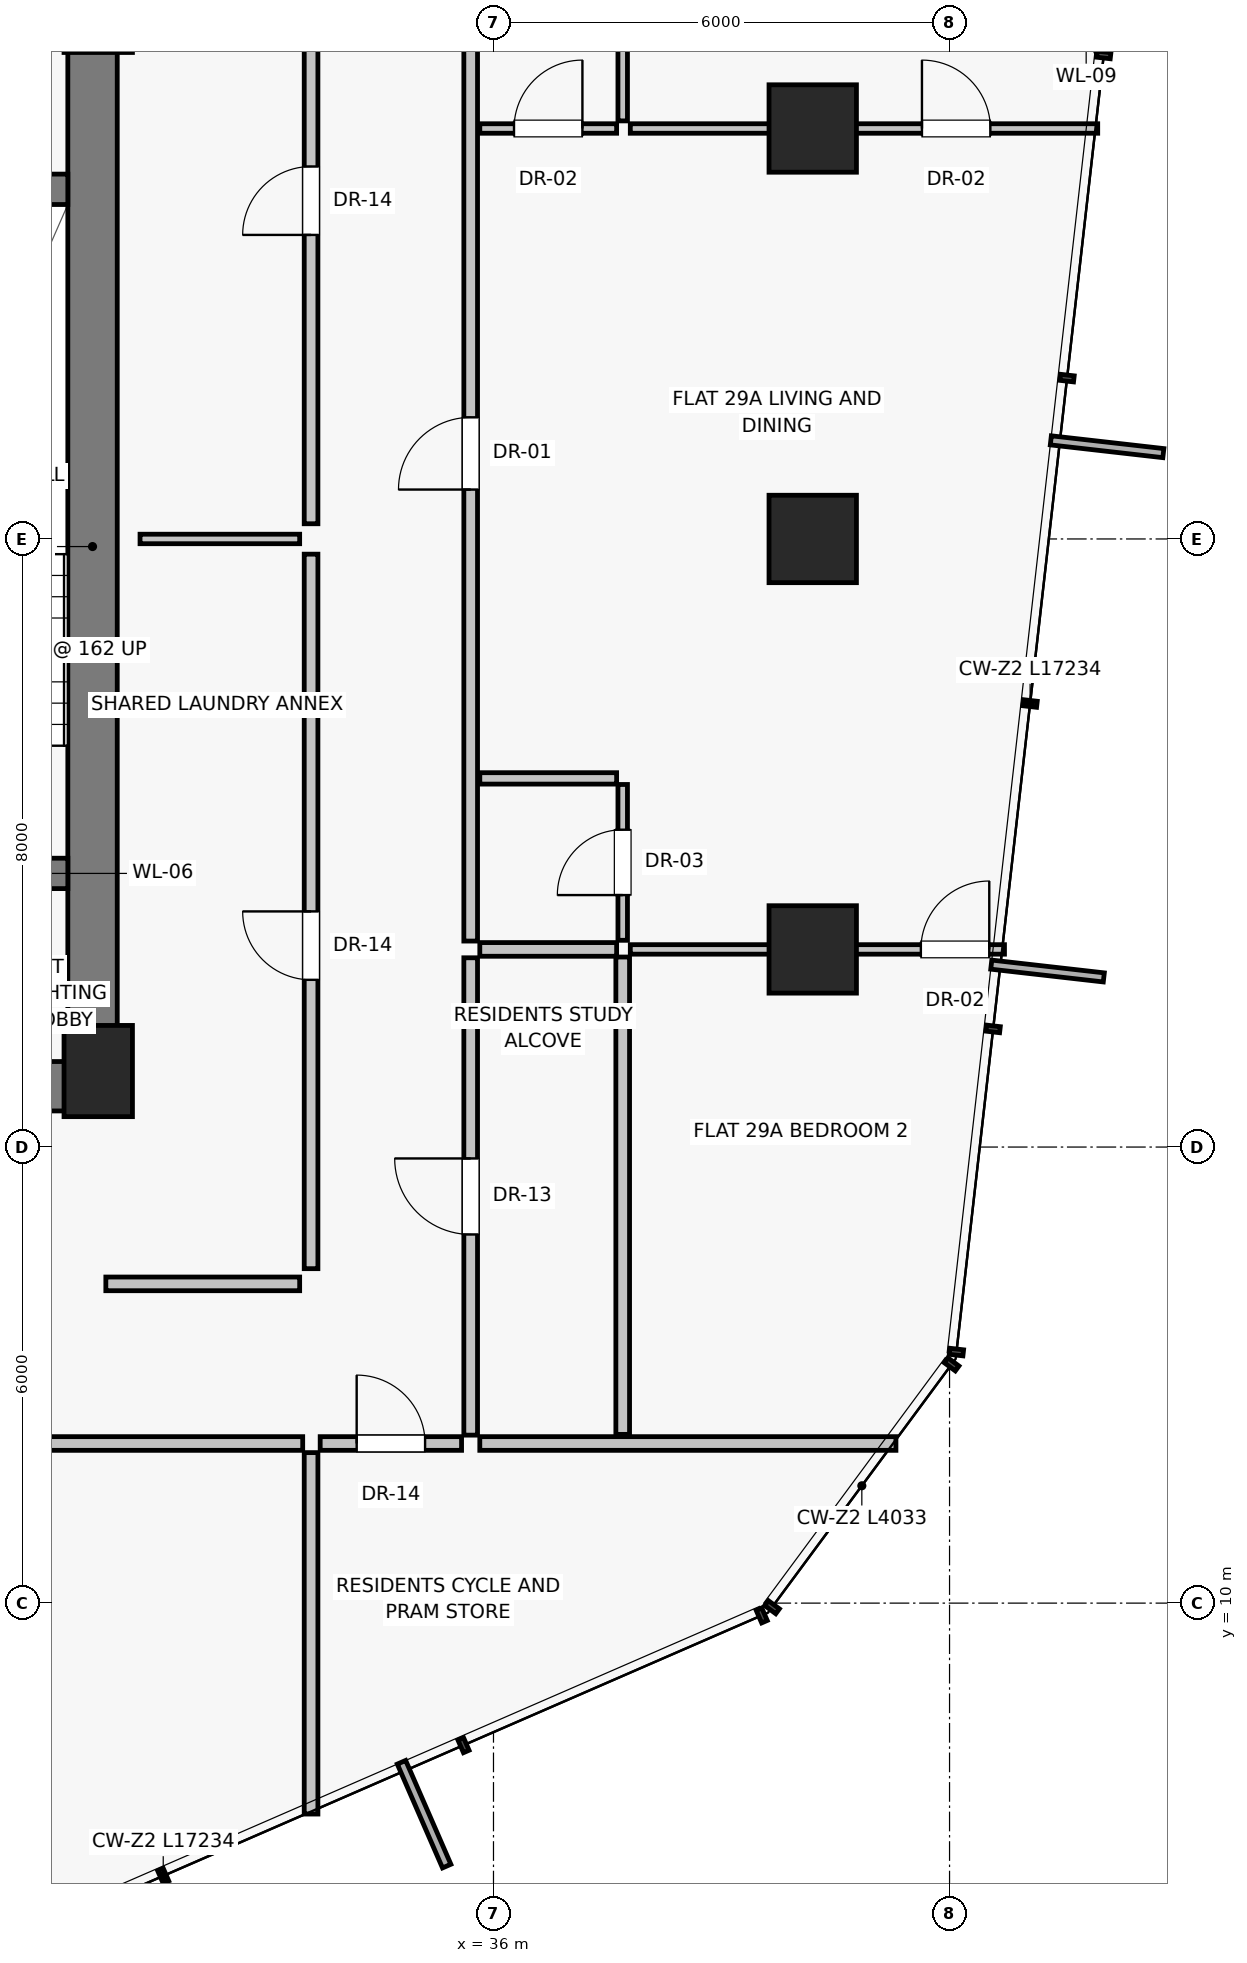
"""IFC4 building model, lengths in metres.
Left out: names, types, materials, properties, quantities, classifications, styles, units other than length and angle.
Written with IfcOpenShell. Run it as: python <this file> out.ifc"""

import sys

from ifc_helpers import new_model, si_unit, direction, frame, frame_2d, origin, origin_2d, place, context, subcontext, project, spatial, rectangle, extrude, source, transform, mapped, element, fill, save


model = new_model("IFC4")
c1 = context("Model", 3, precision=1e-05, world=origin(), true_north=direction((0.0, 1.0)))
c2 = subcontext(c1, "Body", "Model", "MODEL_VIEW")
j1 = project(units=[si_unit("LENGTHUNIT", "METRE"), si_unit("PLANEANGLEUNIT", "RADIAN")], contexts=[c1])
p1 = place(None, origin())
s1 = spatial("IfcSite", under=j1, at=p1, CompositionType="ELEMENT")
p2 = place(p1, origin())
s2 = spatial("IfcBuilding", under=s1, at=p2, CompositionType="ELEMENT")
p3 = place(p2, frame((0.0, 0.0, 105.7)))
s3 = spatial("IfcBuildingStorey", under=s2, at=p3, CompositionType="ELEMENT", Elevation=105.7)
p4 = place(p3, frame((30.8, 17.0, 0.0), z_axis=(0.0, 0.0, 1.0), x_axis=(1.0, 0.0, 0.0)))
e1 = element("IfcColumn", 1, at=p4, inside=s3, PredefinedType="PILASTER", context=c2, shape_type="SweptSolid", body=[
    extrude(rectangle(XDim=0.9, YDim=1.2, at=origin_2d()), origin(), (0.0, 0.0, 1.0), 3.25),
])
for number, where, z_axis, x_axis in (
    (2, (40.2, 18.6, 0.0), (0.0, 0.0, 1.0), (1.0, 0.0, 0.0)),
    (3, (40.2, 24.0, 0.0), (0.0, 0.0, 1.0), (1.0, 0.0, 0.0)),
    (4, (40.2, 29.4, 0.0), (0.0, 0.0, 1.0), (1.0, 0.0, 0.0)),
):
    element("IfcColumn", number, at=place(p3, frame(where, z_axis=z_axis, x_axis=x_axis)), inside=s3, PredefinedType="COLUMN", context=c2, shape_type="SweptSolid", body=[
        extrude(rectangle(XDim=1.15, YDim=1.15, at=origin_2d()), origin(), (0.0, 0.0, 1.0), 3.25),
    ])
p5 = place(p3, frame((44.055, 30.42, 0.0), z_axis=(0.0, 0.0, 1.0), x_axis=(-0.399084577484, 0.916914118124, 0.0)))
e5 = element("IfcWall", 5, at=p5, inside=s3, PredefinedType="SOLIDWALL", context=c2, shape_type="SweptSolid", body=[
    extrude(rectangle(XDim=4.233, YDim=0.25, at=frame_2d((2.117, 0.0))), origin(), (0.0, 0.0, 1.0), 2.97),
])
p6 = place(p5, frame((1.542, 0.0, 0.0)))
e6 = element("IfcOpeningElement", 6, at=p6, cuts=e5, PredefinedType="OPENING", context=c2, shape_type="SweptSolid", body=[
    extrude(rectangle(XDim=1.15, YDim=2.25, at=frame_2d((0.575, 1.125))), frame((0.0, 0.135, 0.0), z_axis=(0.0, -1.0, 0.0), x_axis=(1.0, 0.0, 0.0)), (0.0, 0.0, 1.0), 0.27),
])
p7 = place(p3, frame((30.725, 16.8, 0.0), z_axis=(0.0, 0.0, 1.0), x_axis=(0.0, 1.0, 0.0)))
e7 = element("IfcWall", 7, at=p7, inside=s3, PredefinedType="SHEAR", context=c2, shape_type="SweptSolid", body=[
    extrude(rectangle(XDim=14.2, YDim=0.65, at=frame_2d((7.1, 0.0))), origin(), (0.0, 0.0, 1.0), 2.97),
])
p8 = place(p3, frame((24.95, 16.8, 0.0), z_axis=(0.0, 0.0, 1.0), x_axis=(1.0, 0.0, 0.0)))
e8 = element("IfcWall", 8, at=p8, inside=s3, PredefinedType="SHEAR", context=c2, shape_type="SweptSolid", body=[
    extrude(rectangle(XDim=5.85, YDim=0.65, at=frame_2d((2.925, 0.0))), origin(), (0.0, 0.0, 1.0), 2.97),
])
p9 = place(p8, frame((2.15, 0.0, 0.0)))
e9 = element("IfcOpeningElement", 9, at=p9, cuts=e8, PredefinedType="OPENING", context=c2, shape_type="SweptSolid", body=[
    extrude(rectangle(XDim=1.2, YDim=2.03, at=frame_2d((0.6, 1.015))), frame((0.0, 0.335, 0.0), z_axis=(0.0, -1.0, 0.0), x_axis=(1.0, 0.0, 0.0)), (0.0, 0.0, 1.0), 0.67),
])
p10 = place(p3, frame((27.0, 19.6, 0.0), z_axis=(0.0, 0.0, 1.0), x_axis=(1.0, 0.0, 0.0)))
e10 = element("IfcWall", 10, at=p10, inside=s3, PredefinedType="SHEAR", context=c2, shape_type="SweptSolid", body=[
    extrude(rectangle(XDim=3.4, YDim=0.4, at=frame_2d((1.7, 0.0))), origin(), (0.0, 0.0, 1.0), 2.97),
])
p11 = place(p10, frame((1.05, 0.0, 0.0)))
e11 = element("IfcOpeningElement", 11, at=p11, cuts=e10, PredefinedType="OPENING", context=c2, shape_type="SweptSolid", body=[
    extrude(rectangle(XDim=1.1, YDim=2.03, at=frame_2d((0.55, 1.015))), frame((0.0, 0.21, 0.0), z_axis=(0.0, -1.0, 0.0), x_axis=(1.0, 0.0, 0.0)), (0.0, 0.0, 1.0), 0.42),
])
p12 = place(p3, frame((27.0, 28.6, 0.0), z_axis=(0.0, 0.0, 1.0), x_axis=(1.0, 0.0, 0.0)))
e12 = element("IfcWall", 12, at=p12, inside=s3, PredefinedType="SHEAR", context=c2, shape_type="SweptSolid", body=[
    extrude(rectangle(XDim=3.4, YDim=0.4, at=frame_2d((1.7, 0.0))), origin(), (0.0, 0.0, 1.0), 2.97),
])
p13 = place(p3, frame((33.6, 14.4, 0.0), z_axis=(0.0, 0.0, 1.0), x_axis=(0.0, 1.0, 0.0)))
e13 = element("IfcWall", 13, at=p13, inside=s3, PredefinedType="PARTITIONING", context=c2, shape_type="SweptSolid", body=[
    extrude(rectangle(XDim=9.4, YDim=0.18, at=frame_2d((4.7, 0.0))), origin(), (0.0, 0.0, 1.0), 2.97),
])
p14 = place(p13, frame((3.8, 0.0, 0.0)))
e14 = element("IfcOpeningElement", 14, at=p14, cuts=e13, PredefinedType="OPENING", context=c2, shape_type="SweptSolid", body=[
    extrude(rectangle(XDim=0.9, YDim=2.01, at=frame_2d((0.45, 1.005))), frame((0.0, 0.1, 0.0), z_axis=(0.0, -1.0, 0.0), x_axis=(1.0, 0.0, 0.0)), (0.0, 0.0, 1.0), 0.2),
])
p15 = place(p3, frame((33.6, 24.2, 0.0), z_axis=(0.0, 0.0, 1.0), x_axis=(0.0, 1.0, 0.0)))
e15 = element("IfcWall", 15, at=p15, inside=s3, PredefinedType="PARTITIONING", context=c2, shape_type="SweptSolid", body=[
    extrude(rectangle(XDim=9.2, YDim=0.18, at=frame_2d((4.6, 0.0))), origin(), (0.0, 0.0, 1.0), 2.97),
])
p16 = place(p15, frame((3.8, 0.0, 0.0)))
e16 = element("IfcOpeningElement", 16, at=p16, cuts=e15, PredefinedType="OPENING", context=c2, shape_type="SweptSolid", body=[
    extrude(rectangle(XDim=0.9, YDim=2.01, at=frame_2d((0.45, 1.005))), frame((0.0, 0.1, 0.0), z_axis=(0.0, -1.0, 0.0), x_axis=(1.0, 0.0, 0.0)), (0.0, 0.0, 1.0), 0.2),
])
p17 = place(p3, frame((31.35, 24.0, 0.0), z_axis=(0.0, 0.0, 1.0), x_axis=(1.0, 0.0, 0.0)))
e17 = element("IfcWall", 17, at=p17, inside=s3, PredefinedType="PARTITIONING", context=c2, shape_type="SweptSolid", body=[
    extrude(rectangle(XDim=2.1, YDim=0.125, at=frame_2d((1.05, 0.0))), origin(), (0.0, 0.0, 1.0), 2.97),
])
p18 = place(p3, frame((30.9, 14.2, 0.0), z_axis=(0.0, 0.0, 1.0), x_axis=(1.0, 0.0, 0.0)))
e18 = element("IfcWall", 18, at=p18, inside=s3, PredefinedType="PARTITIONING", context=c2, shape_type="SweptSolid", body=[
    extrude(rectangle(XDim=2.55, YDim=0.18, at=frame_2d((1.275, 0.0))), origin(), (0.0, 0.0, 1.0), 2.97),
])
p19 = place(p3, frame((33.6, 11.98, 0.0), z_axis=(0.0, 0.0, 1.0), x_axis=(0.0, -1.0, 0.0)))
e19 = element("IfcWall", 19, at=p19, inside=s3, PredefinedType="PARTITIONING", context=c2, shape_type="SweptSolid", body=[
    extrude(rectangle(XDim=4.755, YDim=0.18, at=frame_2d((2.377, 0.0))), origin(), (0.0, 0.0, 1.0), 2.97),
])
p20 = place(p3, frame((24.554, 12.1, 0.0), z_axis=(0.0, 0.0, 1.0), x_axis=(1.0, 0.0, 0.0)))
e20 = element("IfcWall", 20, at=p20, inside=s3, PredefinedType="PARTITIONING", context=c2, shape_type="SweptSolid", body=[
    extrude(rectangle(XDim=8.936, YDim=0.18, at=frame_2d((4.468, 0.0))), origin(), (0.0, 0.0, 1.0), 2.55),
])
p21 = place(p20, frame((3.968, 0.0, 0.0)))
e21 = element("IfcOpeningElement", 21, at=p21, cuts=e20, PredefinedType="OPENING", context=c2, shape_type="SweptSolid", body=[
    extrude(rectangle(XDim=1.0, YDim=2.01, at=frame_2d((0.5, 1.005))), frame((0.0, 0.1, 0.0), z_axis=(0.0, -1.0, 0.0), x_axis=(1.0, 0.0, 0.0)), (0.0, 0.0, 1.0), 0.2),
])
p22 = place(p3, frame((35.82, 12.1, 0.0), z_axis=(0.0, 0.0, 1.0), x_axis=(1.0, 0.0, 0.0)))
e22 = element("IfcWall", 22, at=p22, inside=s3, PredefinedType="PARTITIONING", context=c2, shape_type="SweptSolid", body=[
    extrude(rectangle(XDim=5.475, YDim=0.18, at=frame_2d((2.737, 0.0))), origin(), (0.0, 0.0, 1.0), 2.97),
])
p23 = place(p3, frame((35.7, 12.21, 0.0), z_axis=(0.0, 0.0, 1.0), x_axis=(0.0, 1.0, 0.0)))
e23 = element("IfcWall", 23, at=p23, inside=s3, PredefinedType="PARTITIONING", context=c2, shape_type="SweptSolid", body=[
    extrude(rectangle(XDim=6.28, YDim=0.18, at=frame_2d((3.14, 0.0))), origin(), (0.0, 0.0, 1.0), 2.55),
])
p24 = place(p23, frame((2.64, 0.0, 0.0)))
e24 = element("IfcOpeningElement", 24, at=p24, cuts=e23, PredefinedType="OPENING", context=c2, shape_type="SweptSolid", body=[
    extrude(rectangle(XDim=1.0, YDim=2.01, at=frame_2d((0.5, 1.005))), frame((0.0, 0.1, 0.0), z_axis=(0.0, -1.0, 0.0), x_axis=(1.0, 0.0, 0.0)), (0.0, 0.0, 1.0), 0.2),
])
p25 = place(p3, frame((35.7, 18.71, 0.0), z_axis=(0.0, 0.0, 1.0), x_axis=(0.0, 1.0, 0.0)))
e25 = element("IfcWall", 25, at=p25, inside=s3, PredefinedType="PARTITIONING", context=c2, shape_type="SweptSolid", body=[
    extrude(rectangle(XDim=16.88, YDim=0.18, at=frame_2d((8.44, 0.0))), origin(), (0.0, 0.0, 1.0), 2.55),
])
p26 = place(p25, frame((5.94, 0.0, 0.0)))
e26 = element("IfcOpeningElement", 26, at=p26, cuts=e25, PredefinedType="OPENING", context=c2, shape_type="SweptSolid", body=[
    extrude(rectangle(XDim=0.95, YDim=2.02, at=frame_2d((0.475, 1.01))), frame((0.0, 0.1, 0.0), z_axis=(0.0, -1.0, 0.0), x_axis=(1.0, 0.0, 0.0)), (0.0, 0.0, 1.0), 0.2),
])
p27 = place(p3, frame((37.7, 12.22, 0.0), z_axis=(0.0, 0.0, 1.0), x_axis=(0.0, 1.0, 0.0)))
e27 = element("IfcWall", 27, at=p27, inside=s3, PredefinedType="PARTITIONING", context=c2, shape_type="SweptSolid", body=[
    extrude(rectangle(XDim=6.28, YDim=0.18, at=frame_2d((3.14, 0.0))), origin(), (0.0, 0.0, 1.0), 2.97),
])
p28 = place(p3, frame((35.82, 18.6, 0.0), z_axis=(0.0, 0.0, 1.0), x_axis=(1.0, 0.0, 0.0)))
e28 = element("IfcWall", 28, at=p28, inside=s3, PredefinedType="PARTITIONING", context=c2, shape_type="SweptSolid", body=[
    extrude(rectangle(XDim=1.8, YDim=0.18, at=frame_2d((0.9, 0.0))), origin(), (0.0, 0.0, 1.0), 2.348),
])
p29 = place(p3, frame((37.8, 18.6, 0.0), z_axis=(0.0, 0.0, 1.0), x_axis=(1.0, 0.0, 0.0)))
e29 = element("IfcWall", 29, at=p29, inside=s3, PredefinedType="PARTITIONING", context=c2, shape_type="SweptSolid", body=[
    extrude(rectangle(XDim=4.923, YDim=0.125, at=frame_2d((2.461, 0.0))), origin(), (0.0, 0.0, 1.0), 2.348),
])
p30 = place(p29, frame((3.823, 0.0, 0.0)))
e30 = element("IfcOpeningElement", 30, at=p30, cuts=e29, PredefinedType="OPENING", context=c2, shape_type="SweptSolid", body=[
    extrude(rectangle(XDim=0.9, YDim=2.01, at=frame_2d((0.45, 1.005))), frame((0.0, 0.073, 0.0), z_axis=(0.0, -1.0, 0.0), x_axis=(1.0, 0.0, 0.0)), (0.0, 0.0, 1.0), 0.145),
])
p31 = place(p3, frame((35.82, 20.85, 0.0), z_axis=(0.0, 0.0, 1.0), x_axis=(1.0, 0.0, 0.0)))
e31 = element("IfcWall", 31, at=p31, inside=s3, PredefinedType="PARTITIONING", context=c2, shape_type="SweptSolid", body=[
    extrude(rectangle(XDim=1.8, YDim=0.15, at=frame_2d((0.9, 0.0))), origin(), (0.0, 0.0, 1.0), 2.97),
])
p32 = place(p3, frame((37.7, 18.72, 0.0), z_axis=(0.0, 0.0, 1.0), x_axis=(0.0, 1.0, 0.0)))
e32 = element("IfcWall", 32, at=p32, inside=s3, PredefinedType="PARTITIONING", context=c2, shape_type="SweptSolid", body=[
    extrude(rectangle(XDim=2.05, YDim=0.125, at=frame_2d((1.025, 0.0))), origin(), (0.0, 0.0, 1.0), 2.97),
])
p33 = place(p32, frame((0.595, 0.0, 0.0)))
e33 = element("IfcOpeningElement", 33, at=p33, cuts=e32, PredefinedType="OPENING", context=c2, shape_type="SweptSolid", body=[
    extrude(rectangle(XDim=0.86, YDim=2.01, at=frame_2d((0.43, 1.005))), frame((0.0, 0.073, 0.0), z_axis=(0.0, -1.0, 0.0), x_axis=(1.0, 0.0, 0.0)), (0.0, 0.0, 1.0), 0.145),
])
p34 = place(p3, frame((35.82, 29.4, 0.0), z_axis=(0.0, 0.0, 1.0), x_axis=(1.0, 0.0, 0.0)))
e34 = element("IfcWall", 34, at=p34, inside=s3, PredefinedType="PARTITIONING", context=c2, shape_type="SweptSolid", body=[
    extrude(rectangle(XDim=1.8, YDim=0.125, at=frame_2d((0.9, 0.0))), origin(), (0.0, 0.0, 1.0), 2.348),
])
p35 = place(p34, frame((0.45, 0.0, 0.0)))
e35 = element("IfcOpeningElement", 35, at=p35, cuts=e34, PredefinedType="OPENING", context=c2, shape_type="SweptSolid", body=[
    extrude(rectangle(XDim=0.9, YDim=2.01, at=frame_2d((0.45, 1.005))), frame((0.0, 0.073, 0.0), z_axis=(0.0, -1.0, 0.0), x_axis=(1.0, 0.0, 0.0)), (0.0, 0.0, 1.0), 0.145),
])
p36 = place(p3, frame((37.7, 29.5, 0.0), z_axis=(0.0, 0.0, 1.0), x_axis=(0.0, 1.0, 0.0)))
e36 = element("IfcWall", 36, at=p36, inside=s3, PredefinedType="PARTITIONING", context=c2, shape_type="SweptSolid", body=[
    extrude(rectangle(XDim=6.08, YDim=0.125, at=frame_2d((3.04, 0.0))), origin(), (0.0, 0.0, 1.0), 2.97),
])
p37 = place(p3, frame((37.8, 29.4, 0.0), z_axis=(0.0, 0.0, 1.0), x_axis=(1.0, 0.0, 0.0)))
e37 = element("IfcWall", 37, at=p37, inside=s3, PredefinedType="PARTITIONING", context=c2, shape_type="SweptSolid", body=[
    extrude(rectangle(XDim=6.149, YDim=0.125, at=frame_2d((3.075, 0.0))), origin(), (0.0, 0.0, 1.0), 2.348),
])
p38 = place(p37, frame((3.837, 0.0, 0.0)))
e38 = element("IfcOpeningElement", 38, at=p38, cuts=e37, PredefinedType="OPENING", context=c2, shape_type="SweptSolid", body=[
    extrude(rectangle(XDim=0.9, YDim=2.01, at=frame_2d((0.45, 1.005))), frame((0.0, 0.073, 0.0), z_axis=(0.0, -1.0, 0.0), x_axis=(1.0, 0.0, 0.0)), (0.0, 0.0, 1.0), 0.145),
])
p39 = place(p3, frame((33.72, 12.1, 0.0), z_axis=(0.0, 0.0, 1.0), x_axis=(1.0, 0.0, 0.0)))
e39 = element("IfcWall", 39, at=p39, inside=s3, PredefinedType="PARTITIONING", context=c2, shape_type="SweptSolid", body=[
    extrude(rectangle(XDim=1.86, YDim=0.18, at=frame_2d((0.93, 0.0))), origin(), (0.0, 0.0, 1.0), 2.97),
])
p40 = place(p39, frame((0.48, 0.0, 0.0)))
e40 = element("IfcOpeningElement", 40, at=p40, cuts=e39, PredefinedType="OPENING", context=c2, shape_type="SweptSolid", body=[
    extrude(rectangle(XDim=0.9, YDim=2.01, at=frame_2d((0.45, 1.005))), frame((0.0, 0.1, 0.0), z_axis=(0.0, -1.0, 0.0), x_axis=(1.0, 0.0, 0.0)), (0.0, 0.0, 1.0), 0.2),
])
m1 = source(origin(), c2, "Body", "SweptSolid", [
    extrude(rectangle(XDim=0.9, YDim=2.01, at=frame_2d((0.45, 1.005))), frame((0.0, 0.025, 0.0), z_axis=(0.0, -1.0, 0.0), x_axis=(1.0, 0.0, 0.0)), (0.0, 0.0, 1.0), 0.05),
])
p41 = place(p14, origin())
e41 = element("IfcDoor", 41, at=p41, inside=s3, OperationType="SINGLE_SWING_RIGHT", PredefinedType="DOOR", context=c2, shape_type="MappedRepresentation", body=[
    mapped(m1, transform((0.0, 0.0, 0.0), scale=1.0)),
])
fill(e14, e41)
p42 = place(p16, origin())
e42 = element("IfcDoor", 42, at=p42, inside=s3, OperationType="SINGLE_SWING_LEFT", PredefinedType="DOOR", context=c2, shape_type="MappedRepresentation", body=[
    mapped(m1, transform((0.0, 0.0, 0.0), scale=1.0)),
])
fill(e16, e42)
m2 = source(origin(), c2, "Body", "SweptSolid", [
    extrude(rectangle(XDim=1.0, YDim=2.01, at=frame_2d((0.5, 1.005))), frame((0.0, 0.025, 0.0), z_axis=(0.0, -1.0, 0.0), x_axis=(1.0, 0.0, 0.0)), (0.0, 0.0, 1.0), 0.05),
])
p43 = place(p24, origin())
e43 = element("IfcDoor", 43, at=p43, inside=s3, OperationType="SINGLE_SWING_RIGHT", PredefinedType="DOOR", context=c2, shape_type="MappedRepresentation", body=[
    mapped(m2, transform((0.0, 0.0, 0.0), scale=1.0)),
])
fill(e24, e43)
m3 = source(origin(), c2, "Body", "SweptSolid", [
    extrude(rectangle(XDim=0.95, YDim=2.02, at=frame_2d((0.475, 1.01))), frame((0.0, 0.025, 0.0), z_axis=(0.0, -1.0, 0.0), x_axis=(1.0, 0.0, 0.0)), (0.0, 0.0, 1.0), 0.05),
])
p44 = place(p26, origin())
e44 = element("IfcDoor", 44, at=p44, inside=s3, OperationType="SINGLE_SWING_LEFT", PredefinedType="DOOR", context=c2, shape_type="MappedRepresentation", body=[
    mapped(m3, transform((0.0, 0.0, 0.0), scale=1.0)),
])
fill(e26, e44)
p45 = place(p30, origin())
e45 = element("IfcDoor", 45, at=p45, inside=s3, OperationType="SINGLE_SWING_RIGHT", PredefinedType="DOOR", context=c2, shape_type="MappedRepresentation", body=[
    mapped(m1, transform((0.0, 0.0, 0.0), scale=1.0)),
])
fill(e30, e45)
m4 = source(origin(), c2, "Body", "SweptSolid", [
    extrude(rectangle(XDim=0.86, YDim=2.01, at=frame_2d((0.43, 1.005))), frame((0.0, 0.025, 0.0), z_axis=(0.0, -1.0, 0.0), x_axis=(1.0, 0.0, 0.0)), (0.0, 0.0, 1.0), 0.05),
])
p46 = place(p33, origin())
e46 = element("IfcDoor", 46, at=p46, inside=s3, OperationType="SINGLE_SWING_LEFT", PredefinedType="DOOR", context=c2, shape_type="MappedRepresentation", body=[
    mapped(m4, transform((0.0, 0.0, 0.0), scale=1.0)),
])
fill(e33, e46)
p47 = place(p35, origin())
e47 = element("IfcDoor", 47, at=p47, inside=s3, OperationType="SINGLE_SWING_RIGHT", PredefinedType="DOOR", context=c2, shape_type="MappedRepresentation", body=[
    mapped(m1, transform((0.0, 0.0, 0.0), scale=1.0)),
])
fill(e35, e47)
p48 = place(p38, origin())
e48 = element("IfcDoor", 48, at=p48, inside=s3, OperationType="SINGLE_SWING_LEFT", PredefinedType="DOOR", context=c2, shape_type="MappedRepresentation", body=[
    mapped(m1, transform((0.0, 0.0, 0.0), scale=1.0)),
])
fill(e38, e48)
p49 = place(p40, origin())
e49 = element("IfcDoor", 49, at=p49, inside=s3, OperationType="SINGLE_SWING_LEFT", PredefinedType="DOOR", context=c2, shape_type="MappedRepresentation", body=[
    mapped(m1, transform((0.0, 0.0, 0.0), scale=1.0)),
])
fill(e40, e49)
save(model, sys.argv[1])
